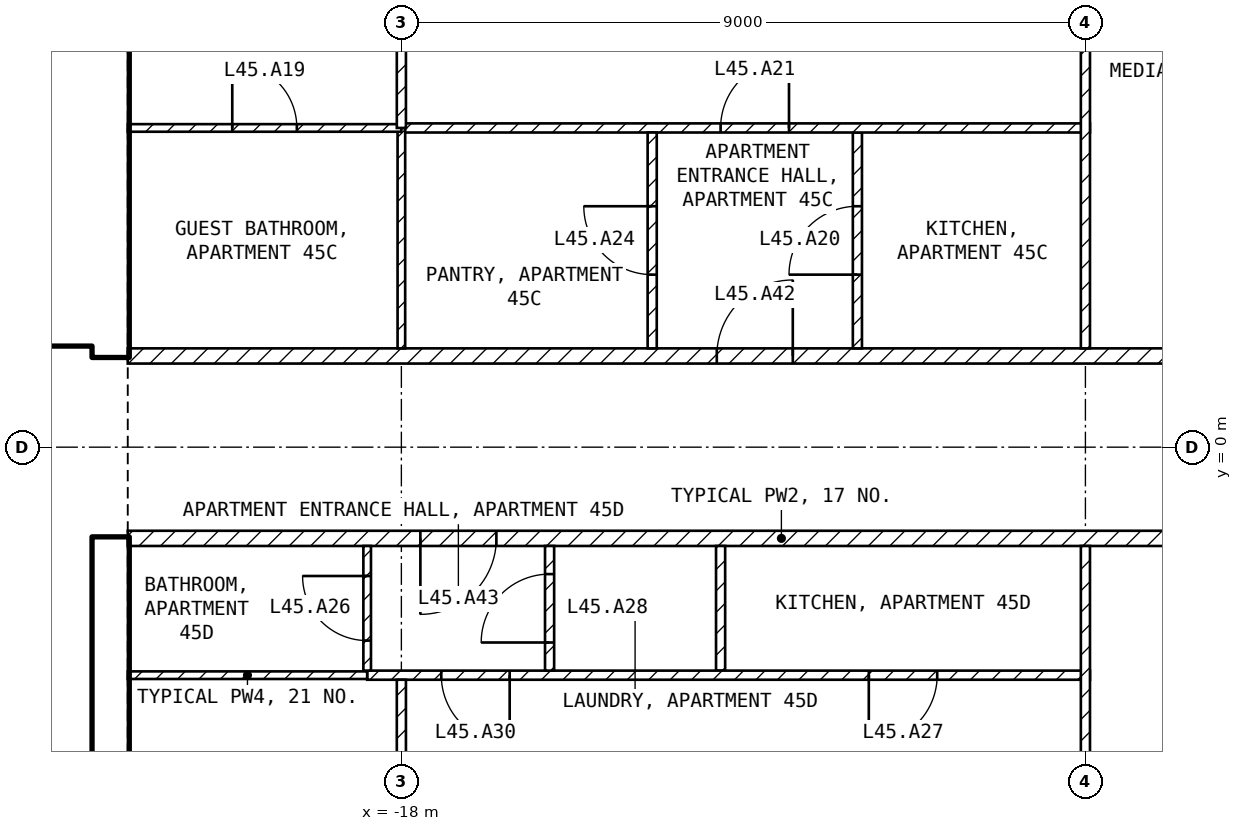
"""IFC4 building model, lengths in metres.
Left out: names, types, materials, properties, quantities, classifications, styles, units other than length and angle.
Written with IfcOpenShell. Run it as: python <this file> out.ifc"""

import sys

from ifc_helpers import new_model, si_unit, direction, frame, frame_2d, origin, place, context, subcontext, project, spatial, rectangle, extrude, element, fill, save


model = new_model("IFC4")
c1 = context("Model", 3, precision=1e-05, world=origin(), true_north=direction((0.0, 1.0)))
c2 = subcontext(c1, "Body", "Model", "MODEL_VIEW")
j1 = project(units=[si_unit("LENGTHUNIT", "METRE"), si_unit("PLANEANGLEUNIT", "RADIAN")], contexts=[c1])
p1 = place(None, origin())
s1 = spatial("IfcSite", under=j1, at=p1, CompositionType="ELEMENT")
p2 = place(p1, origin())
s2 = spatial("IfcBuilding", under=s1, at=p2, CompositionType="ELEMENT")
p3 = place(p2, frame((0.0, 0.0, 184.1)))
s3 = spatial("IfcBuildingStorey", under=s2, at=p3, CompositionType="ELEMENT", Elevation=184.1)
for number, where, z_axis, x_axis in (
    (1, (-21.825, -8.1, 0.0), (0.0, 0.0, 1.0), (0.0, 1.0, 0.0)),
    (2, (-21.825, 1.2, 0.0), (0.0, 0.0, 1.0), (0.0, 1.0, 0.0)),
):
    element("IfcWall", number, at=place(p3, frame(where, z_axis=z_axis, x_axis=x_axis)), inside=s3, PredefinedType="SHEAR", context=c2, shape_type="SweptSolid", body=[
        extrude(rectangle(XDim=6.9, YDim=0.45, at=frame_2d((3.45, 0.0))), origin(), (0.0, 0.0, 1.0), 3.25),
    ])
p4 = place(p3, frame((-33.2, 1.45, 0.0), z_axis=(0.0, 0.0, 1.0), x_axis=(1.0, 0.0, 0.0)))
e3 = element("IfcWall", 3, at=p4, inside=s3, PredefinedType="SOLIDWALL", context=c2, shape_type="SweptSolid", body=[
    extrude(rectangle(XDim=11.15, YDim=0.2, at=frame_2d((5.575, 0.0))), origin(), (0.0, 0.0, 1.0), 3.25),
])
p5 = place(p4, frame((9.4, 0.0, 0.0)))
e4 = element("IfcOpeningElement", 4, at=p5, cuts=e3, PredefinedType="OPENING", context=c2, shape_type="SweptSolid", body=[
    extrude(rectangle(XDim=1.0, YDim=2.1, at=frame_2d((0.5, 1.05))), frame((0.0, 0.11, 0.0), z_axis=(0.0, -1.0, 0.0), x_axis=(1.0, 0.0, 0.0)), (0.0, 0.0, 1.0), 0.22),
])
p6 = place(p4, frame((6.9, 0.0, 0.0)))
e5 = element("IfcOpeningElement", 5, at=p6, cuts=e3, PredefinedType="OPENING", context=c2, shape_type="SweptSolid", body=[
    extrude(rectangle(XDim=1.0, YDim=2.1, at=frame_2d((0.5, 1.05))), frame((0.0, 0.11, 0.0), z_axis=(0.0, -1.0, 0.0), x_axis=(1.0, 0.0, 0.0)), (0.0, 0.0, 1.0), 0.22),
])
p7 = place(p4, frame((1.1, 0.0, 0.0)))
e6 = element("IfcOpeningElement", 6, at=p7, cuts=e3, PredefinedType="OPENING", context=c2, shape_type="SweptSolid", body=[
    extrude(rectangle(XDim=0.9, YDim=2.1, at=frame_2d((0.45, 1.05))), frame((0.0, 0.11, 0.0), z_axis=(0.0, -1.0, 0.0), x_axis=(1.0, 0.0, 0.0)), (0.0, 0.0, 1.0), 0.22),
])
p8 = place(p3, frame((-28.35, 5.15, 0.0), z_axis=(0.0, 0.0, 1.0), x_axis=(1.0, 0.0, 0.0)))
e7 = element("IfcWall", 7, at=p8, inside=s3, PredefinedType="SOLIDWALL", context=c2, shape_type="SweptSolid", body=[
    extrude(rectangle(XDim=6.3, YDim=0.2, at=frame_2d((3.15, 0.0))), origin(), (0.0, 0.0, 1.0), 3.25),
])
p9 = place(p8, frame((5.1, 0.0, 0.0)))
e8 = element("IfcOpeningElement", 8, at=p9, cuts=e7, PredefinedType="OPENING", context=c2, shape_type="SweptSolid", body=[
    extrude(rectangle(XDim=1.0, YDim=2.1, at=frame_2d((0.5, 1.05))), frame((0.0, 0.11, 0.0), z_axis=(0.0, -1.0, 0.0), x_axis=(1.0, 0.0, 0.0)), (0.0, 0.0, 1.0), 0.22),
])
p10 = place(p3, frame((-21.6, 1.2, 0.0), z_axis=(0.0, 0.0, 1.0), x_axis=(1.0, 0.0, 0.0)))
e9 = element("IfcWall", 9, at=p10, inside=s3, PredefinedType="PARTITIONING", context=c2, shape_type="SweptSolid", body=[
    extrude(rectangle(XDim=17.2, YDim=0.2, at=frame_2d((8.6, 0.0))), origin(), (0.0, 0.0, 1.0), 3.25),
])
p11 = place(p10, frame((7.75, 0.0, 0.0)))
e10 = element("IfcOpeningElement", 10, at=p11, cuts=e9, PredefinedType="OPENING", context=c2, shape_type="SweptSolid", body=[
    extrude(rectangle(XDim=1.0, YDim=2.1, at=frame_2d((0.5, 1.05))), frame((0.0, 0.11, 0.0), z_axis=(0.0, -1.0, 0.0), x_axis=(1.0, 0.0, 0.0)), (0.0, 0.0, 1.0), 0.22),
])
p12 = place(p3, frame((-4.4, -1.2, 0.0), z_axis=(0.0, 0.0, 1.0), x_axis=(-1.0, 0.0, 0.0)))
e11 = element("IfcWall", 11, at=p12, inside=s3, PredefinedType="PARTITIONING", context=c2, shape_type="SweptSolid", body=[
    extrude(rectangle(XDim=17.2, YDim=0.2, at=frame_2d((8.6, 0.0))), origin(), (0.0, 0.0, 1.0), 3.25),
])
p13 = place(p12, frame((12.35, 0.0, 0.0)))
e12 = element("IfcOpeningElement", 12, at=p13, cuts=e11, PredefinedType="OPENING", context=c2, shape_type="SweptSolid", body=[
    extrude(rectangle(XDim=1.0, YDim=2.1, at=frame_2d((0.5, 1.05))), frame((0.0, 0.11, 0.0), z_axis=(0.0, -1.0, 0.0), x_axis=(1.0, 0.0, 0.0)), (0.0, 0.0, 1.0), 0.22),
])
p14 = place(p3, frame((-12.0, 1.3, 0.0), z_axis=(0.0, 0.0, 1.0), x_axis=(0.0, 1.0, 0.0)))
e13 = element("IfcWall", 13, at=p14, inside=s3, PredefinedType="PARTITIONING", context=c2, shape_type="SweptSolid", body=[
    extrude(rectangle(XDim=2.84, YDim=0.12, at=frame_2d((1.42, 0.0))), origin(), (0.0, 0.0, 1.0), 3.25),
])
p15 = place(p14, frame((0.97, 0.0, 0.0)))
e14 = element("IfcOpeningElement", 14, at=p15, cuts=e13, PredefinedType="OPENING", context=c2, shape_type="SweptSolid", body=[
    extrude(rectangle(XDim=0.9, YDim=2.1, at=frame_2d((0.45, 1.05))), frame((0.0, 0.07, 0.0), z_axis=(0.0, -1.0, 0.0), x_axis=(1.0, 0.0, 0.0)), (0.0, 0.0, 1.0), 0.14),
])
p16 = place(p3, frame((-18.0, 4.2, 0.0), z_axis=(0.0, 0.0, 1.0), x_axis=(1.0, 0.0, 0.0)))
e15 = element("IfcWall", 15, at=p16, inside=s3, PredefinedType="PARTITIONING", context=c2, shape_type="SweptSolid", body=[
    extrude(rectangle(XDim=9.06, YDim=0.12, at=frame_2d((4.53, 0.0))), origin(), (0.0, 0.0, 1.0), 3.25),
])
p17 = place(p16, frame((4.2, 0.0, 0.0)))
e16 = element("IfcOpeningElement", 16, at=p17, cuts=e15, PredefinedType="OPENING", context=c2, shape_type="SweptSolid", body=[
    extrude(rectangle(XDim=0.9, YDim=2.1, at=frame_2d((0.45, 1.05))), frame((0.0, 0.07, 0.0), z_axis=(0.0, -1.0, 0.0), x_axis=(1.0, 0.0, 0.0)), (0.0, 0.0, 1.0), 0.14),
])
p18 = place(p3, frame((-9.0, 8.92, 0.0), z_axis=(0.0, 0.0, 1.0), x_axis=(0.0, -1.0, 0.0)))
e17 = element("IfcWall", 17, at=p18, inside=s3, PredefinedType="PARTITIONING", context=c2, shape_type="SweptSolid", body=[
    extrude(rectangle(XDim=7.62, YDim=0.12, at=frame_2d((3.81, 0.0))), origin(), (0.0, 0.0, 1.0), 3.25),
])
p19 = place(p18, frame((2.52, 0.0, 0.0)))
e18 = element("IfcOpeningElement", 18, at=p19, cuts=e17, PredefinedType="OPENING", context=c2, shape_type="SweptSolid", body=[
    extrude(rectangle(XDim=0.9, YDim=2.1, at=frame_2d((0.45, 1.05))), frame((0.0, 0.07, 0.0), z_axis=(0.0, -1.0, 0.0), x_axis=(1.0, 0.0, 0.0)), (0.0, 0.0, 1.0), 0.14),
])
p20 = place(p3, frame((-14.7, 1.3, 0.0), z_axis=(0.0, 0.0, 1.0), x_axis=(0.0, 1.0, 0.0)))
e19 = element("IfcWall", 19, at=p20, inside=s3, PredefinedType="PARTITIONING", context=c2, shape_type="SweptSolid", body=[
    extrude(rectangle(XDim=2.84, YDim=0.12, at=frame_2d((1.42, 0.0))), origin(), (0.0, 0.0, 1.0), 3.25),
])
p21 = place(p20, frame((0.97, 0.0, 0.0)))
e20 = element("IfcOpeningElement", 20, at=p21, cuts=e19, PredefinedType="OPENING", context=c2, shape_type="SweptSolid", body=[
    extrude(rectangle(XDim=0.9, YDim=2.1, at=frame_2d((0.45, 1.05))), frame((0.0, 0.07, 0.0), z_axis=(0.0, -1.0, 0.0), x_axis=(1.0, 0.0, 0.0)), (0.0, 0.0, 1.0), 0.14),
])
p22 = place(p3, frame((-18.0, 1.3, 0.0), z_axis=(0.0, 0.0, 1.0), x_axis=(0.0, 1.0, 0.0)))
e21 = element("IfcWall", 21, at=p22, inside=s3, PredefinedType="PARTITIONING", context=c2, shape_type="SweptSolid", body=[
    extrude(rectangle(XDim=2.9, YDim=0.1, at=frame_2d((1.45, 0.0))), origin(), (0.0, 0.0, 1.0), 2.48),
])
p23 = place(p3, frame((-21.6, 4.2, 0.0), z_axis=(0.0, 0.0, 1.0), x_axis=(1.0, 0.0, 0.0)))
e22 = element("IfcWall", 22, at=p23, inside=s3, PredefinedType="PARTITIONING", context=c2, shape_type="SweptSolid", body=[
    extrude(rectangle(XDim=3.6, YDim=0.1, at=frame_2d((1.8, 0.0))), origin(), (0.0, 0.0, 1.0), 3.25),
])
p24 = place(p23, frame((1.375, 0.0, 0.0)))
e23 = element("IfcOpeningElement", 23, at=p24, cuts=e22, PredefinedType="OPENING", context=c2, shape_type="SweptSolid", body=[
    extrude(rectangle(XDim=0.85, YDim=2.1, at=frame_2d((0.425, 1.05))), frame((0.0, 0.06, 0.0), z_axis=(0.0, -1.0, 0.0), x_axis=(1.0, 0.0, 0.0)), (0.0, 0.0, 1.0), 0.12),
])
p25 = place(p3, frame((-18.0, 4.2, 0.0), z_axis=(0.0, 0.0, 1.0), x_axis=(0.0, 1.0, 0.0)))
e24 = element("IfcWall", 24, at=p25, inside=s3, PredefinedType="PARTITIONING", context=c2, shape_type="SweptSolid", body=[
    extrude(rectangle(XDim=4.72, YDim=0.12, at=frame_2d((2.36, 0.0))), origin(), (0.0, 0.0, 1.0), 2.48),
])
p26 = place(p25, frame((1.3, 0.0, 0.0)))
e25 = element("IfcOpeningElement", 25, at=p26, cuts=e24, PredefinedType="OPENING", context=c2, shape_type="SweptSolid", body=[
    extrude(rectangle(XDim=0.9, YDim=2.1, at=frame_2d((0.45, 1.05))), frame((0.0, 0.07, 0.0), z_axis=(0.0, -1.0, 0.0), x_axis=(1.0, 0.0, 0.0)), (0.0, 0.0, 1.0), 0.14),
])
p27 = place(p3, frame((-13.8, -2.94, 0.0), z_axis=(0.0, 0.0, 1.0), x_axis=(0.0, 1.0, 0.0)))
e26 = element("IfcWall", 26, at=p27, inside=s3, PredefinedType="PARTITIONING", context=c2, shape_type="SweptSolid", body=[
    extrude(rectangle(XDim=1.64, YDim=0.12, at=frame_2d((0.82, 0.0))), origin(), (0.0, 0.0, 1.0), 3.25),
])
p28 = place(p3, frame((-8.94, -3.0, 0.0), z_axis=(0.0, 0.0, 1.0), x_axis=(-1.0, 0.0, 0.0)))
e27 = element("IfcWall", 27, at=p28, inside=s3, PredefinedType="PARTITIONING", context=c2, shape_type="SweptSolid", body=[
    extrude(rectangle(XDim=9.51, YDim=0.12, at=frame_2d((4.755, 0.0))), origin(), (0.0, 0.0, 1.0), 3.25),
])
p29 = place(p28, frame((2.01, 0.0, 0.0)))
e28 = element("IfcOpeningElement", 28, at=p29, cuts=e27, PredefinedType="OPENING", context=c2, shape_type="SweptSolid", body=[
    extrude(rectangle(XDim=0.9, YDim=2.1, at=frame_2d((0.45, 1.05))), frame((0.0, 0.07, 0.0), z_axis=(0.0, -1.0, 0.0), x_axis=(1.0, 0.0, 0.0)), (0.0, 0.0, 1.0), 0.14),
])
p30 = place(p28, frame((7.635, 0.0, 0.0)))
e29 = element("IfcOpeningElement", 29, at=p30, cuts=e27, PredefinedType="OPENING", context=c2, shape_type="SweptSolid", body=[
    extrude(rectangle(XDim=0.9, YDim=2.1, at=frame_2d((0.45, 1.05))), frame((0.0, 0.07, 0.0), z_axis=(0.0, -1.0, 0.0), x_axis=(1.0, 0.0, 0.0)), (0.0, 0.0, 1.0), 0.14),
])
p31 = place(p3, frame((-9.0, -1.3, 0.0), z_axis=(0.0, 0.0, 1.0), x_axis=(0.0, -1.0, 0.0)))
e30 = element("IfcWall", 30, at=p31, inside=s3, PredefinedType="PARTITIONING", context=c2, shape_type="SweptSolid", body=[
    extrude(rectangle(XDim=7.62, YDim=0.12, at=frame_2d((3.81, 0.0))), origin(), (0.0, 0.0, 1.0), 3.25),
])
p32 = place(p31, frame((4.1, 0.0, 0.0)))
e31 = element("IfcOpeningElement", 31, at=p32, cuts=e30, PredefinedType="OPENING", context=c2, shape_type="SweptSolid", body=[
    extrude(rectangle(XDim=0.9, YDim=2.1, at=frame_2d((0.45, 1.05))), frame((0.0, 0.07, 0.0), z_axis=(0.0, -1.0, 0.0), x_axis=(1.0, 0.0, 0.0)), (0.0, 0.0, 1.0), 0.14),
])
p33 = place(p3, frame((-16.05, -2.94, 0.0), z_axis=(0.0, 0.0, 1.0), x_axis=(0.0, 1.0, 0.0)))
e32 = element("IfcWall", 32, at=p33, inside=s3, PredefinedType="PARTITIONING", context=c2, shape_type="SweptSolid", body=[
    extrude(rectangle(XDim=1.64, YDim=0.12, at=frame_2d((0.82, 0.0))), origin(), (0.0, 0.0, 1.0), 3.25),
])
p34 = place(p33, frame((0.37, 0.0, 0.0)))
e33 = element("IfcOpeningElement", 33, at=p34, cuts=e32, PredefinedType="OPENING", context=c2, shape_type="SweptSolid", body=[
    extrude(rectangle(XDim=0.9, YDim=2.1, at=frame_2d((0.45, 1.05))), frame((0.0, 0.07, 0.0), z_axis=(0.0, -1.0, 0.0), x_axis=(1.0, 0.0, 0.0)), (0.0, 0.0, 1.0), 0.14),
])
p35 = place(p3, frame((-18.45, -2.94, 0.0), z_axis=(0.0, 0.0, 1.0), x_axis=(0.0, 1.0, 0.0)))
e34 = element("IfcWall", 34, at=p35, inside=s3, PredefinedType="PARTITIONING", context=c2, shape_type="SweptSolid", body=[
    extrude(rectangle(XDim=1.64, YDim=0.1, at=frame_2d((0.82, 0.0))), origin(), (0.0, 0.0, 1.0), 3.25),
])
p36 = place(p35, frame((0.395, 0.0, 0.0)))
e35 = element("IfcOpeningElement", 35, at=p36, cuts=e34, PredefinedType="OPENING", context=c2, shape_type="SweptSolid", body=[
    extrude(rectangle(XDim=0.85, YDim=2.1, at=frame_2d((0.425, 1.05))), frame((0.0, 0.06, 0.0), z_axis=(0.0, -1.0, 0.0), x_axis=(1.0, 0.0, 0.0)), (0.0, 0.0, 1.0), 0.12),
])
p37 = place(p3, frame((-18.45, -3.0, 0.0), z_axis=(0.0, 0.0, 1.0), x_axis=(-1.0, 0.0, 0.0)))
e36 = element("IfcWall", 36, at=p37, inside=s3, PredefinedType="PARTITIONING", context=c2, shape_type="SweptSolid", body=[
    extrude(rectangle(XDim=3.15, YDim=0.1, at=frame_2d((1.575, 0.0))), origin(), (0.0, 0.0, 1.0), 3.25),
])
p38 = place(p3, frame((-18.0, -8.92, 0.0), z_axis=(0.0, 0.0, 1.0), x_axis=(0.0, 1.0, 0.0)))
e37 = element("IfcWall", 37, at=p38, inside=s3, PredefinedType="PARTITIONING", context=c2, shape_type="SweptSolid", body=[
    extrude(rectangle(XDim=5.86, YDim=0.12, at=frame_2d((2.93, 0.0))), origin(), (0.0, 0.0, 1.0), 2.48),
])
p39 = place(p38, frame((2.59, 0.0, 0.0)))
e38 = element("IfcOpeningElement", 38, at=p39, cuts=e37, PredefinedType="OPENING", context=c2, shape_type="SweptSolid", body=[
    extrude(rectangle(XDim=0.9, YDim=2.1, at=frame_2d((0.45, 1.05))), frame((0.0, 0.07, 0.0), z_axis=(0.0, -1.0, 0.0), x_axis=(1.0, 0.0, 0.0)), (0.0, 0.0, 1.0), 0.14),
])
p40 = place(p9, origin())
e39 = element("IfcDoor", 39, at=p40, inside=s3, OperationType="SINGLE_SWING_LEFT", PredefinedType="DOOR", context=c2, shape_type="SweptSolid", body=[
    extrude(rectangle(XDim=1.0, YDim=2.1, at=frame_2d((0.5, 1.05))), frame((0.0, 0.025, 0.0), z_axis=(0.0, -1.0, 0.0), x_axis=(1.0, 0.0, 0.0)), (0.0, 0.0, 1.0), 0.05),
])
fill(e8, e39)
p41 = place(p24, origin())
e40 = element("IfcDoor", 40, at=p41, inside=s3, OperationType="SINGLE_SWING_LEFT", PredefinedType="DOOR", context=c2, shape_type="SweptSolid", body=[
    extrude(rectangle(XDim=0.85, YDim=2.1, at=frame_2d((0.425, 1.05))), frame((0.0, 0.025, 0.0), z_axis=(0.0, -1.0, 0.0), x_axis=(1.0, 0.0, 0.0)), (0.0, 0.0, 1.0), 0.05),
])
fill(e23, e40)
p42 = place(p15, origin())
e41 = element("IfcDoor", 41, at=p42, inside=s3, OperationType="SINGLE_SWING_LEFT", PredefinedType="DOOR", context=c2, shape_type="SweptSolid", body=[
    extrude(rectangle(XDim=0.9, YDim=2.1, at=frame_2d((0.45, 1.05))), frame((0.0, 0.025, 0.0), z_axis=(0.0, -1.0, 0.0), x_axis=(1.0, 0.0, 0.0)), (0.0, 0.0, 1.0), 0.05),
])
fill(e14, e41)
p43 = place(p17, origin())
e42 = element("IfcDoor", 42, at=p43, inside=s3, OperationType="SINGLE_SWING_RIGHT", PredefinedType="DOOR", context=c2, shape_type="SweptSolid", body=[
    extrude(rectangle(XDim=0.9, YDim=2.1, at=frame_2d((0.45, 1.05))), frame((0.0, 0.025, 0.0), z_axis=(0.0, -1.0, 0.0), x_axis=(1.0, 0.0, 0.0)), (0.0, 0.0, 1.0), 0.05),
])
fill(e16, e42)
p44 = place(p21, origin())
e43 = element("IfcDoor", 43, at=p44, inside=s3, OperationType="SINGLE_SWING_RIGHT", PredefinedType="DOOR", context=c2, shape_type="SweptSolid", body=[
    extrude(rectangle(XDim=0.9, YDim=2.1, at=frame_2d((0.45, 1.05))), frame((0.0, 0.025, 0.0), z_axis=(0.0, -1.0, 0.0), x_axis=(1.0, 0.0, 0.0)), (0.0, 0.0, 1.0), 0.05),
])
fill(e20, e43)
p45 = place(p36, origin())
e44 = element("IfcDoor", 44, at=p45, inside=s3, OperationType="SINGLE_SWING_RIGHT", PredefinedType="DOOR", context=c2, shape_type="SweptSolid", body=[
    extrude(rectangle(XDim=0.85, YDim=2.1, at=frame_2d((0.425, 1.05))), frame((0.0, 0.025, 0.0), z_axis=(0.0, -1.0, 0.0), x_axis=(1.0, 0.0, 0.0)), (0.0, 0.0, 1.0), 0.05),
])
fill(e35, e44)
p46 = place(p29, origin())
e45 = element("IfcDoor", 45, at=p46, inside=s3, OperationType="SINGLE_SWING_RIGHT", PredefinedType="DOOR", context=c2, shape_type="SweptSolid", body=[
    extrude(rectangle(XDim=0.9, YDim=2.1, at=frame_2d((0.45, 1.05))), frame((0.0, 0.025, 0.0), z_axis=(0.0, -1.0, 0.0), x_axis=(1.0, 0.0, 0.0)), (0.0, 0.0, 1.0), 0.05),
])
fill(e28, e45)
p47 = place(p34, origin())
e46 = element("IfcDoor", 46, at=p47, inside=s3, OperationType="SINGLE_SWING_LEFT", PredefinedType="DOOR", context=c2, shape_type="SweptSolid", body=[
    extrude(rectangle(XDim=0.9, YDim=2.1, at=frame_2d((0.45, 1.05))), frame((0.0, 0.025, 0.0), z_axis=(0.0, -1.0, 0.0), x_axis=(1.0, 0.0, 0.0)), (0.0, 0.0, 1.0), 0.05),
])
fill(e33, e46)
p48 = place(p30, origin())
e47 = element("IfcDoor", 47, at=p48, inside=s3, OperationType="SINGLE_SWING_LEFT", PredefinedType="DOOR", context=c2, shape_type="SweptSolid", body=[
    extrude(rectangle(XDim=0.9, YDim=2.1, at=frame_2d((0.45, 1.05))), frame((0.0, 0.025, 0.0), z_axis=(0.0, -1.0, 0.0), x_axis=(1.0, 0.0, 0.0)), (0.0, 0.0, 1.0), 0.05),
])
fill(e29, e47)
p49 = place(p11, origin())
e48 = element("IfcDoor", 48, at=p49, inside=s3, OperationType="SINGLE_SWING_RIGHT", PredefinedType="DOOR", context=c2, shape_type="SweptSolid", body=[
    extrude(rectangle(XDim=1.0, YDim=2.1, at=frame_2d((0.5, 1.05))), frame((0.0, 0.025, 0.0), z_axis=(0.0, -1.0, 0.0), x_axis=(1.0, 0.0, 0.0)), (0.0, 0.0, 1.0), 0.05),
])
fill(e10, e48)
p50 = place(p13, origin())
e49 = element("IfcDoor", 49, at=p50, inside=s3, OperationType="SINGLE_SWING_RIGHT", PredefinedType="DOOR", context=c2, shape_type="SweptSolid", body=[
    extrude(rectangle(XDim=1.0, YDim=2.1, at=frame_2d((0.5, 1.05))), frame((0.0, 0.025, 0.0), z_axis=(0.0, -1.0, 0.0), x_axis=(1.0, 0.0, 0.0)), (0.0, 0.0, 1.0), 0.05),
])
fill(e12, e49)
save(model, sys.argv[1])
